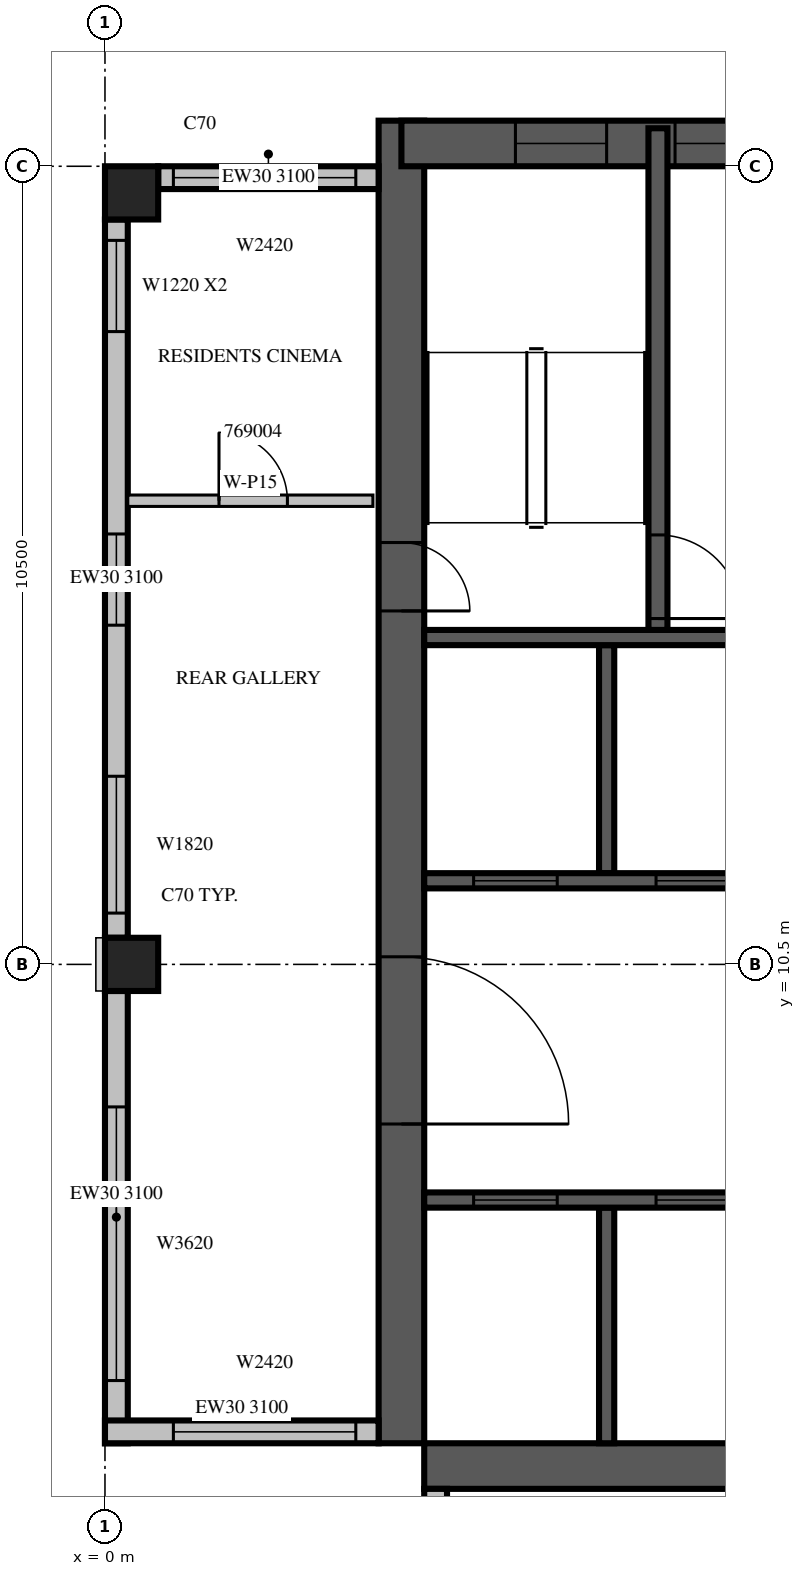
"""IFC4 building model, lengths in metres.
Left out: names, types, materials, properties, quantities, classifications, styles, units other than length and angle.
Written with IfcOpenShell. Run it as: python <this file> out.ifc"""

import sys

from ifc_helpers import new_model, si_unit, direction, frame, frame_2d, origin, origin_2d, place, context, subcontext, project, spatial, rectangle, extrude, source, transform, mapped, element, fill, save


model = new_model("IFC4")
c1 = context("Model", 3, precision=1e-05, world=origin(), true_north=direction((0.0, 1.0)))
c2 = subcontext(c1, "Body", "Model", "MODEL_VIEW")
j1 = project(units=[si_unit("LENGTHUNIT", "METRE"), si_unit("PLANEANGLEUNIT", "RADIAN")], contexts=[c1])
p1 = place(None, origin())
s1 = spatial("IfcSite", under=j1, at=p1, CompositionType="ELEMENT")
p2 = place(p1, origin())
s2 = spatial("IfcBuilding", under=s1, at=p2, CompositionType="ELEMENT")
p3 = place(p2, frame((0.0, 0.0, 302.0)))
s3 = spatial("IfcBuildingStorey", under=s2, at=p3, CompositionType="ELEMENT", Elevation=302.0)
m1 = source(origin(), c2, "Body", "SweptSolid", [
    extrude(rectangle(XDim=0.7, YDim=0.7, at=origin_2d()), origin(), (0.0, 0.0, 1.0), 3.5),
])
for number, where, z_axis, x_axis in (
    (1, (0.35, 10.5, 0.0), (0.0, 0.0, 1.0), (1.0, 0.0, 0.0)),
    (2, (0.35, 20.65, 0.0), (0.0, 0.0, 1.0), (1.0, 0.0, 0.0)),
):
    element("IfcColumn", number, at=place(p3, frame(where, z_axis=z_axis, x_axis=x_axis)), inside=s3, PredefinedType="COLUMN", context=c2, shape_type="MappedRepresentation", body=[
        mapped(m1, transform((0.0, 0.0, 0.0), scale=1.0)),
    ])
m2 = source(origin(), c2, "Body", "SweptSolid", [
    extrude(rectangle(XDim=17.4, YDim=0.6, at=frame_2d((8.7, 0.0))), origin(), (0.0, 0.0, 1.0), 3.5),
])
p4 = place(p3, frame((3.9, 4.2, 0.0), z_axis=(0.0, 0.0, 1.0), x_axis=(0.0, 1.0, 0.0)))
e3 = element("IfcWall", 3, at=p4, inside=s3, PredefinedType="SHEAR", context=c2, shape_type="MappedRepresentation", body=[
    mapped(m2, transform((0.0, 0.0, 0.0), scale=1.0)),
])
m3 = source(origin(), c2, "Body", "SweptSolid", [
    extrude(rectangle(XDim=2.2, YDim=2.1, at=frame_2d((1.1, 1.05))), frame((0.0, 0.31, 0.0), z_axis=(0.0, -1.0, 0.0), x_axis=(1.0, 0.0, 0.0)), (0.0, 0.0, 1.0), 0.62),
])
p5 = place(p4, frame((4.2, 0.0, 0.0)))
e4 = element("IfcOpeningElement", 4, at=p5, cuts=e3, PredefinedType="OPENING", context=c2, shape_type="MappedRepresentation", body=[
    mapped(m3, transform((0.0, 0.0, 0.0), scale=1.0)),
])
m4 = source(origin(), c2, "Body", "SweptSolid", [
    extrude(rectangle(XDim=0.9, YDim=2.1, at=frame_2d((0.45, 1.05))), frame((0.0, 0.31, 0.0), z_axis=(0.0, -1.0, 0.0), x_axis=(1.0, 0.0, 0.0)), (0.0, 0.0, 1.0), 0.62),
])
p6 = place(p4, frame((10.95, 0.0, 0.0)))
e5 = element("IfcOpeningElement", 5, at=p6, cuts=e3, PredefinedType="OPENING", context=c2, shape_type="MappedRepresentation", body=[
    mapped(m4, transform((0.0, 0.0, 0.0), scale=1.0)),
])
p7 = place(p3, frame((4.2, 3.9, 0.0), z_axis=(0.0, 0.0, 1.0), x_axis=(1.0, 0.0, 0.0)))
e6 = element("IfcWall", 6, at=p7, inside=s3, PredefinedType="SHEAR", context=c2, shape_type="MappedRepresentation", body=[
    mapped(m2, transform((0.0, 0.0, 0.0), scale=1.0)),
])
p8 = place(p7, frame((12.8, 0.0, 0.0)))
e7 = element("IfcOpeningElement", 7, at=p8, cuts=e6, PredefinedType="OPENING", context=c2, shape_type="MappedRepresentation", body=[
    mapped(m4, transform((0.0, 0.0, 0.0), scale=1.0)),
])
m5 = source(origin(), c2, "Body", "SweptSolid", [
    extrude(rectangle(XDim=6.6, YDim=0.6, at=frame_2d((3.3, 0.0))), origin(), (0.0, 0.0, 1.0), 3.5),
])
p9 = place(p3, frame((3.9, 21.3, 0.0), z_axis=(0.0, 0.0, 1.0), x_axis=(1.0, 0.0, 0.0)))
e8 = element("IfcWall", 8, at=p9, inside=s3, PredefinedType="SHEAR", context=c2, shape_type="MappedRepresentation", body=[
    mapped(m5, transform((0.0, 0.0, 0.0), scale=1.0)),
])
m6 = source(origin(), c2, "Body", "SweptSolid", [
    extrude(rectangle(XDim=1.2, YDim=2.4, at=frame_2d((0.6, 1.2))), frame((0.0, 0.31, 0.0), z_axis=(0.0, -1.0, 0.0), x_axis=(1.0, 0.0, 0.0)), (0.0, 0.0, 1.0), 0.62),
])
p10 = place(p9, frame((1.5, 0.0, 0.6)))
e9 = element("IfcOpeningElement", 9, at=p10, cuts=e8, PredefinedType="OPENING", context=c2, shape_type="MappedRepresentation", body=[
    mapped(m6, transform((0.0, 0.0, 0.0), scale=1.0)),
])
p11 = place(p9, frame((3.6, 0.0, 0.6)))
e10 = element("IfcOpeningElement", 10, at=p11, cuts=e8, PredefinedType="OPENING", context=c2, shape_type="MappedRepresentation", body=[
    mapped(m6, transform((0.0, 0.0, 0.0), scale=1.0)),
])
m7 = source(origin(), c2, "Body", "SweptSolid", [
    extrude(rectangle(XDim=2.9, YDim=0.3, at=frame_2d((1.45, 0.0))), origin(), (0.0, 0.0, 1.0), 3.1),
])
p12 = place(p3, frame((3.6, 20.85, 0.0), z_axis=(0.0, 0.0, 1.0), x_axis=(-1.0, 0.0, 0.0)))
e11 = element("IfcWall", 11, at=p12, inside=s3, PredefinedType="STANDARD", context=c2, shape_type="MappedRepresentation", body=[
    mapped(m7, transform((0.0, 0.0, 0.0), scale=1.0)),
])
m8 = source(origin(), c2, "Body", "SweptSolid", [
    extrude(rectangle(XDim=2.4, YDim=2.0, at=frame_2d((1.2, 1.0))), frame((0.0, 0.16, 0.0), z_axis=(0.0, -1.0, 0.0), x_axis=(1.0, 0.0, 0.0)), (0.0, 0.0, 1.0), 0.32),
])
p13 = place(p12, frame((0.3, 0.0, 0.6)))
e12 = element("IfcOpeningElement", 12, at=p13, cuts=e11, PredefinedType="OPENING", context=c2, shape_type="MappedRepresentation", body=[
    mapped(m8, transform((0.0, 0.0, 0.0), scale=1.0)),
])
m9 = source(origin(), c2, "Body", "SweptSolid", [
    extrude(rectangle(XDim=9.45, YDim=0.3, at=frame_2d((4.725, 0.0))), origin(), (0.0, 0.0, 1.0), 3.1),
])
p14 = place(p3, frame((0.15, 20.3, 0.0), z_axis=(0.0, 0.0, 1.0), x_axis=(0.0, -1.0, 0.0)))
e13 = element("IfcWall", 13, at=p14, inside=s3, PredefinedType="STANDARD", context=c2, shape_type="MappedRepresentation", body=[
    mapped(m9, transform((0.0, 0.0, 0.0), scale=1.0)),
])
m10 = source(origin(), c2, "Body", "SweptSolid", [
    extrude(rectangle(XDim=1.2, YDim=2.0, at=frame_2d((0.6, 1.0))), frame((0.0, 0.16, 0.0), z_axis=(0.0, -1.0, 0.0), x_axis=(1.0, 0.0, 0.0)), (0.0, 0.0, 1.0), 0.32),
])
p15 = place(p14, frame((0.275, 0.0, 0.6)))
e14 = element("IfcOpeningElement", 14, at=p15, cuts=e13, PredefinedType="OPENING", context=c2, shape_type="MappedRepresentation", body=[
    mapped(m10, transform((0.0, 0.0, 0.0), scale=1.0)),
])
m11 = source(origin(), c2, "Body", "SweptSolid", [
    extrude(rectangle(XDim=1.8, YDim=2.0, at=frame_2d((0.9, 1.0))), frame((0.0, 0.16, 0.0), z_axis=(0.0, -1.0, 0.0), x_axis=(1.0, 0.0, 0.0)), (0.0, 0.0, 1.0), 0.32),
])
p16 = place(p14, frame((7.325, 0.0, 0.6)))
e15 = element("IfcOpeningElement", 15, at=p16, cuts=e13, PredefinedType="OPENING", context=c2, shape_type="MappedRepresentation", body=[
    mapped(m11, transform((0.0, 0.0, 0.0), scale=1.0)),
])
p17 = place(p14, frame((4.138, 0.0, 0.6)))
e16 = element("IfcOpeningElement", 16, at=p17, cuts=e13, PredefinedType="OPENING", context=c2, shape_type="MappedRepresentation", body=[
    mapped(m10, transform((0.0, 0.0, 0.0), scale=1.0)),
])
m12 = source(origin(), c2, "Body", "SweptSolid", [
    extrude(rectangle(XDim=5.95, YDim=0.3, at=frame_2d((2.975, 0.0))), origin(), (0.0, 0.0, 1.0), 3.1),
])
p18 = place(p3, frame((0.15, 10.15, 0.0), z_axis=(0.0, 0.0, 1.0), x_axis=(0.0, -1.0, 0.0)))
e17 = element("IfcWall", 17, at=p18, inside=s3, PredefinedType="STANDARD", context=c2, shape_type="MappedRepresentation", body=[
    mapped(m12, transform((0.0, 0.0, 0.0), scale=1.0)),
])
m13 = source(origin(), c2, "Body", "SweptSolid", [
    extrude(rectangle(XDim=3.6, YDim=2.0, at=frame_2d((1.8, 1.0))), frame((0.0, 0.16, 0.0), z_axis=(0.0, -1.0, 0.0), x_axis=(1.0, 0.0, 0.0)), (0.0, 0.0, 1.0), 0.32),
])
p19 = place(p18, frame((1.525, 0.0, 0.6)))
e18 = element("IfcOpeningElement", 18, at=p19, cuts=e17, PredefinedType="OPENING", context=c2, shape_type="MappedRepresentation", body=[
    mapped(m13, transform((0.0, 0.0, 0.0), scale=1.0)),
])
m14 = source(origin(), c2, "Body", "SweptSolid", [
    extrude(rectangle(XDim=3.6, YDim=0.3, at=frame_2d((1.8, 0.0))), origin(), (0.0, 0.0, 1.0), 3.1),
])
p20 = place(p3, frame((0.0, 4.35, 0.0), z_axis=(0.0, 0.0, 1.0), x_axis=(1.0, 0.0, 0.0)))
e19 = element("IfcWall", 19, at=p20, inside=s3, PredefinedType="STANDARD", context=c2, shape_type="MappedRepresentation", body=[
    mapped(m14, transform((0.0, 0.0, 0.0), scale=1.0)),
])
p21 = place(p20, frame((0.9, 0.0, 0.6)))
e20 = element("IfcOpeningElement", 20, at=p21, cuts=e19, PredefinedType="OPENING", context=c2, shape_type="MappedRepresentation", body=[
    mapped(m8, transform((0.0, 0.0, 0.0), scale=1.0)),
])
p22 = place(p3, frame((4.35, 3.6, 0.0), z_axis=(0.0, 0.0, 1.0), x_axis=(0.0, -1.0, 0.0)))
e21 = element("IfcWall", 21, at=p22, inside=s3, PredefinedType="STANDARD", context=c2, shape_type="MappedRepresentation", body=[
    mapped(m14, transform((0.0, 0.0, 0.0), scale=1.0)),
])
p23 = place(p22, frame((0.3, 0.0, 0.6)))
e22 = element("IfcOpeningElement", 22, at=p23, cuts=e21, PredefinedType="OPENING", context=c2, shape_type="MappedRepresentation", body=[
    mapped(m8, transform((0.0, 0.0, 0.0), scale=1.0)),
])
m15 = source(origin(), c2, "Body", "SweptSolid", [
    extrude(rectangle(XDim=3.1, YDim=0.2, at=frame_2d((1.55, 0.0))), origin(), (0.0, 0.0, 1.0), 3.5),
])
p24 = place(p3, frame((6.6, 4.2, 0.0), z_axis=(0.0, 0.0, 1.0), x_axis=(0.0, 1.0, 0.0)))
e23 = element("IfcWall", 23, at=p24, inside=s3, PredefinedType="SOLIDWALL", context=c2, shape_type="MappedRepresentation", body=[
    mapped(m15, transform((0.0, 0.0, 0.0), scale=1.0)),
])
m16 = source(origin(), c2, "Body", "SweptSolid", [
    extrude(rectangle(XDim=3.0, YDim=0.2, at=frame_2d((1.5, 0.0))), origin(), (0.0, 0.0, 1.0), 3.5),
])
p25 = place(p3, frame((6.6, 11.7, 0.0), z_axis=(0.0, 0.0, 1.0), x_axis=(0.0, 1.0, 0.0)))
e24 = element("IfcWall", 24, at=p25, inside=s3, PredefinedType="SOLIDWALL", context=c2, shape_type="MappedRepresentation", body=[
    mapped(m16, transform((0.0, 0.0, 0.0), scale=1.0)),
])
m17 = source(origin(), c2, "Body", "SweptSolid", [
    extrude(rectangle(XDim=9.6, YDim=0.2, at=frame_2d((4.8, 0.0))), origin(), (0.0, 0.0, 1.0), 3.5),
])
p26 = place(p3, frame((4.2, 7.4, 0.0), z_axis=(0.0, 0.0, 1.0), x_axis=(1.0, 0.0, 0.0)))
e25 = element("IfcWall", 25, at=p26, inside=s3, PredefinedType="SOLIDWALL", context=c2, shape_type="MappedRepresentation", body=[
    mapped(m17, transform((0.0, 0.0, 0.0), scale=1.0)),
])
m18 = source(origin(), c2, "Body", "SweptSolid", [
    extrude(rectangle(XDim=1.1, YDim=2.1, at=frame_2d((0.55, 1.05))), frame((0.0, 0.11, 0.0), z_axis=(0.0, -1.0, 0.0), x_axis=(1.0, 0.0, 0.0)), (0.0, 0.0, 1.0), 0.22),
])
p27 = place(p26, frame((0.65, 0.0, 0.0)))
e26 = element("IfcOpeningElement", 26, at=p27, cuts=e25, PredefinedType="OPENING", context=c2, shape_type="MappedRepresentation", body=[
    mapped(m18, transform((0.0, 0.0, 0.0), scale=1.0)),
])
p28 = place(p26, frame((3.05, 0.0, 0.0)))
e27 = element("IfcOpeningElement", 27, at=p28, cuts=e25, PredefinedType="OPENING", context=c2, shape_type="MappedRepresentation", body=[
    mapped(m18, transform((0.0, 0.0, 0.0), scale=1.0)),
])
p29 = place(p26, frame((5.45, 0.0, 0.0)))
e28 = element("IfcOpeningElement", 28, at=p29, cuts=e25, PredefinedType="OPENING", context=c2, shape_type="MappedRepresentation", body=[
    mapped(m18, transform((0.0, 0.0, 0.0), scale=1.0)),
])
p30 = place(p26, frame((7.85, 0.0, 0.0)))
e29 = element("IfcOpeningElement", 29, at=p30, cuts=e25, PredefinedType="OPENING", context=c2, shape_type="MappedRepresentation", body=[
    mapped(m18, transform((0.0, 0.0, 0.0), scale=1.0)),
])
m19 = source(origin(), c2, "Body", "SweptSolid", [
    extrude(rectangle(XDim=4.8, YDim=0.2, at=frame_2d((2.4, 0.0))), origin(), (0.0, 0.0, 1.0), 3.5),
])
p31 = place(p3, frame((4.2, 11.6, 0.0), z_axis=(0.0, 0.0, 1.0), x_axis=(1.0, 0.0, 0.0)))
e30 = element("IfcWall", 30, at=p31, inside=s3, PredefinedType="SOLIDWALL", context=c2, shape_type="MappedRepresentation", body=[
    mapped(m19, transform((0.0, 0.0, 0.0), scale=1.0)),
])
p32 = place(p31, frame((0.65, 0.0, 0.0)))
e31 = element("IfcOpeningElement", 31, at=p32, cuts=e30, PredefinedType="OPENING", context=c2, shape_type="MappedRepresentation", body=[
    mapped(m18, transform((0.0, 0.0, 0.0), scale=1.0)),
])
p33 = place(p31, frame((3.05, 0.0, 0.0)))
e32 = element("IfcOpeningElement", 32, at=p33, cuts=e30, PredefinedType="OPENING", context=c2, shape_type="MappedRepresentation", body=[
    mapped(m18, transform((0.0, 0.0, 0.0), scale=1.0)),
])
p34 = place(p3, frame((4.2, 14.8, 0.0), z_axis=(0.0, 0.0, 1.0), x_axis=(1.0, 0.0, 0.0)))
e33 = element("IfcWall", 33, at=p34, inside=s3, PredefinedType="SOLIDWALL", context=c2, shape_type="MappedRepresentation", body=[
    mapped(m19, transform((0.0, 0.0, 0.0), scale=1.0)),
])
m20 = source(origin(), c2, "Body", "SweptSolid", [
    extrude(rectangle(XDim=6.6, YDim=0.25, at=frame_2d((3.3, 0.0))), origin(), (0.0, 0.0, 1.0), 3.1),
])
p35 = place(p3, frame((7.275, 14.9, 0.0), z_axis=(0.0, 0.0, 1.0), x_axis=(0.0, 1.0, 0.0)))
e34 = element("IfcWall", 34, at=p35, inside=s3, PredefinedType="SOLIDWALL", context=c2, shape_type="MappedRepresentation", body=[
    mapped(m20, transform((0.0, 0.0, 0.0), scale=1.0)),
])
m21 = source(origin(), c2, "Body", "SweptSolid", [
    extrude(rectangle(XDim=1.1, YDim=2.1, at=frame_2d((0.55, 1.05))), frame((0.0, 0.135, 0.0), z_axis=(0.0, -1.0, 0.0), x_axis=(1.0, 0.0, 0.0)), (0.0, 0.0, 1.0), 0.27),
])
p36 = place(p35, frame((0.15, 0.0, 0.0)))
e35 = element("IfcOpeningElement", 35, at=p36, cuts=e34, PredefinedType="OPENING", context=c2, shape_type="MappedRepresentation", body=[
    mapped(m21, transform((0.0, 0.0, 0.0), scale=1.0)),
])
m22 = source(origin(), c2, "Body", "SweptSolid", [
    extrude(rectangle(XDim=3.225, YDim=0.15, at=frame_2d((1.613, 0.0))), origin(), (0.0, 0.0, 1.0), 3.1),
])
p37 = place(p3, frame((0.3, 16.6, 0.0), z_axis=(0.0, 0.0, 1.0), x_axis=(1.0, 0.0, 0.0)))
e36 = element("IfcWall", 36, at=p37, inside=s3, PredefinedType="PARTITIONING", context=c2, shape_type="MappedRepresentation", body=[
    mapped(m22, transform((0.0, 0.0, 0.0), scale=1.0)),
])
m23 = source(origin(), c2, "Body", "SweptSolid", [
    extrude(rectangle(XDim=0.9, YDim=2.1, at=frame_2d((0.45, 1.05))), frame((0.0, 0.085, 0.0), z_axis=(0.0, -1.0, 0.0), x_axis=(1.0, 0.0, 0.0)), (0.0, 0.0, 1.0), 0.17),
])
p38 = place(p37, frame((1.2, 0.0, 0.0)))
e37 = element("IfcOpeningElement", 37, at=p38, cuts=e36, PredefinedType="OPENING", context=c2, shape_type="MappedRepresentation", body=[
    mapped(m23, transform((0.0, 0.0, 0.0), scale=1.0)),
])
m24 = source(origin(), c2, "Body", "SweptSolid", [
    extrude(rectangle(XDim=2.4, YDim=2.0, at=frame_2d((1.2, 1.0))), frame((0.0, 0.03, 0.0), z_axis=(0.0, -1.0, 0.0), x_axis=(1.0, 0.0, 0.0)), (0.0, 0.0, 1.0), 0.06),
])
p39 = place(p13, origin())
e38 = element("IfcWindow", 38, at=p39, inside=s3, PartitioningType="SINGLE_PANEL", PredefinedType="WINDOW", context=c2, shape_type="MappedRepresentation", body=[
    mapped(m24, transform((0.0, 0.0, 0.0), scale=1.0)),
])
fill(e12, e38)
m25 = source(origin(), c2, "Body", "SweptSolid", [
    extrude(rectangle(XDim=1.2, YDim=2.0, at=frame_2d((0.6, 1.0))), frame((0.0, 0.03, 0.0), z_axis=(0.0, -1.0, 0.0), x_axis=(1.0, 0.0, 0.0)), (0.0, 0.0, 1.0), 0.06),
])
p40 = place(p15, origin())
e39 = element("IfcWindow", 39, at=p40, inside=s3, PartitioningType="SINGLE_PANEL", PredefinedType="WINDOW", context=c2, shape_type="MappedRepresentation", body=[
    mapped(m25, transform((0.0, 0.0, 0.0), scale=1.0)),
])
fill(e14, e39)
m26 = source(origin(), c2, "Body", "SweptSolid", [
    extrude(rectangle(XDim=1.8, YDim=2.0, at=frame_2d((0.9, 1.0))), frame((0.0, 0.03, 0.0), z_axis=(0.0, -1.0, 0.0), x_axis=(1.0, 0.0, 0.0)), (0.0, 0.0, 1.0), 0.06),
])
p41 = place(p16, origin())
e40 = element("IfcWindow", 40, at=p41, inside=s3, PartitioningType="SINGLE_PANEL", PredefinedType="WINDOW", context=c2, shape_type="MappedRepresentation", body=[
    mapped(m26, transform((0.0, 0.0, 0.0), scale=1.0)),
])
fill(e15, e40)
m27 = source(origin(), c2, "Body", "SweptSolid", [
    extrude(rectangle(XDim=3.6, YDim=2.0, at=frame_2d((1.8, 1.0))), frame((0.0, 0.03, 0.0), z_axis=(0.0, -1.0, 0.0), x_axis=(1.0, 0.0, 0.0)), (0.0, 0.0, 1.0), 0.06),
])
p42 = place(p19, origin())
e41 = element("IfcWindow", 41, at=p42, inside=s3, PartitioningType="SINGLE_PANEL", PredefinedType="WINDOW", context=c2, shape_type="MappedRepresentation", body=[
    mapped(m27, transform((0.0, 0.0, 0.0), scale=1.0)),
])
fill(e18, e41)
p43 = place(p17, origin())
e42 = element("IfcWindow", 42, at=p43, inside=s3, PartitioningType="SINGLE_PANEL", PredefinedType="WINDOW", context=c2, shape_type="MappedRepresentation", body=[
    mapped(m25, transform((0.0, 0.0, 0.0), scale=1.0)),
])
fill(e16, e42)
p44 = place(p21, origin())
e43 = element("IfcWindow", 43, at=p44, inside=s3, PartitioningType="SINGLE_PANEL", PredefinedType="WINDOW", context=c2, shape_type="MappedRepresentation", body=[
    mapped(m24, transform((0.0, 0.0, 0.0), scale=1.0)),
])
fill(e20, e43)
m28 = source(origin(), c2, "Body", "SweptSolid", [
    extrude(rectangle(XDim=1.1, YDim=2.1, at=frame_2d((0.55, 1.05))), frame((0.0, 0.025, 0.0), z_axis=(0.0, -1.0, 0.0), x_axis=(1.0, 0.0, 0.0)), (0.0, 0.0, 1.0), 0.05),
])
p45 = place(p27, origin())
e44 = element("IfcDoor", 44, at=p45, inside=s3, OperationType="SLIDING_TO_LEFT", PredefinedType="DOOR", context=c2, shape_type="MappedRepresentation", body=[
    mapped(m28, transform((0.0, 0.0, 0.0), scale=1.0)),
])
fill(e26, e44)
p46 = place(p28, origin())
e45 = element("IfcDoor", 45, at=p46, inside=s3, OperationType="SLIDING_TO_LEFT", PredefinedType="DOOR", context=c2, shape_type="MappedRepresentation", body=[
    mapped(m28, transform((0.0, 0.0, 0.0), scale=1.0)),
])
fill(e27, e45)
p47 = place(p32, origin())
e46 = element("IfcDoor", 46, at=p47, inside=s3, OperationType="SLIDING_TO_LEFT", PredefinedType="DOOR", context=c2, shape_type="MappedRepresentation", body=[
    mapped(m28, transform((0.0, 0.0, 0.0), scale=1.0)),
])
fill(e31, e46)
p48 = place(p33, origin())
e47 = element("IfcDoor", 47, at=p48, inside=s3, OperationType="SLIDING_TO_LEFT", PredefinedType="DOOR", context=c2, shape_type="MappedRepresentation", body=[
    mapped(m28, transform((0.0, 0.0, 0.0), scale=1.0)),
])
fill(e32, e47)
p49 = place(p36, origin())
e48 = element("IfcDoor", 48, at=p49, inside=s3, OperationType="SINGLE_SWING_RIGHT", PredefinedType="DOOR", context=c2, shape_type="MappedRepresentation", body=[
    mapped(m28, transform((0.0, 0.0, 0.0), scale=1.0)),
])
fill(e35, e48)
m29 = source(origin(), c2, "Body", "SweptSolid", [
    extrude(rectangle(XDim=2.2, YDim=2.1, at=frame_2d((1.1, 1.05))), frame((0.0, 0.025, 0.0), z_axis=(0.0, -1.0, 0.0), x_axis=(1.0, 0.0, 0.0)), (0.0, 0.0, 1.0), 0.05),
])
p50 = place(p5, origin())
e49 = element("IfcDoor", 49, at=p50, inside=s3, OperationType="DOUBLE_DOOR_SINGLE_SWING", PredefinedType="DOOR", context=c2, shape_type="MappedRepresentation", body=[
    mapped(m29, transform((0.0, 0.0, 0.0), scale=1.0)),
])
fill(e4, e49)
m30 = source(origin(), c2, "Body", "SweptSolid", [
    extrude(rectangle(XDim=0.9, YDim=2.1, at=frame_2d((0.45, 1.05))), frame((0.0, 0.025, 0.0), z_axis=(0.0, -1.0, 0.0), x_axis=(1.0, 0.0, 0.0)), (0.0, 0.0, 1.0), 0.05),
])
p51 = place(p6, origin())
e50 = element("IfcDoor", 50, at=p51, inside=s3, OperationType="SINGLE_SWING_RIGHT", PredefinedType="DOOR", context=c2, shape_type="MappedRepresentation", body=[
    mapped(m30, transform((0.0, 0.0, 0.0), scale=1.0)),
])
fill(e5, e50)
m31 = source(origin(), c2, "Body", "SweptSolid", [
    extrude(rectangle(XDim=1.2, YDim=2.4, at=frame_2d((0.6, 1.2))), frame((0.0, 0.03, 0.0), z_axis=(0.0, -1.0, 0.0), x_axis=(1.0, 0.0, 0.0)), (0.0, 0.0, 1.0), 0.06),
])
p52 = place(p10, origin())
e51 = element("IfcWindow", 51, at=p52, inside=s3, PartitioningType="SINGLE_PANEL", PredefinedType="WINDOW", context=c2, shape_type="MappedRepresentation", body=[
    mapped(m31, transform((0.0, 0.0, 0.0), scale=1.0)),
])
fill(e9, e51)
p53 = place(p11, origin())
e52 = element("IfcWindow", 52, at=p53, inside=s3, PartitioningType="SINGLE_PANEL", PredefinedType="WINDOW", context=c2, shape_type="MappedRepresentation", body=[
    mapped(m31, transform((0.0, 0.0, 0.0), scale=1.0)),
])
fill(e10, e52)
p54 = place(p38, origin())
e53 = element("IfcDoor", 53, at=p54, inside=s3, OperationType="SINGLE_SWING_LEFT", PredefinedType="DOOR", context=c2, shape_type="MappedRepresentation", body=[
    mapped(m30, transform((0.0, 0.0, 0.0), scale=1.0)),
])
fill(e37, e53)
save(model, sys.argv[1])
